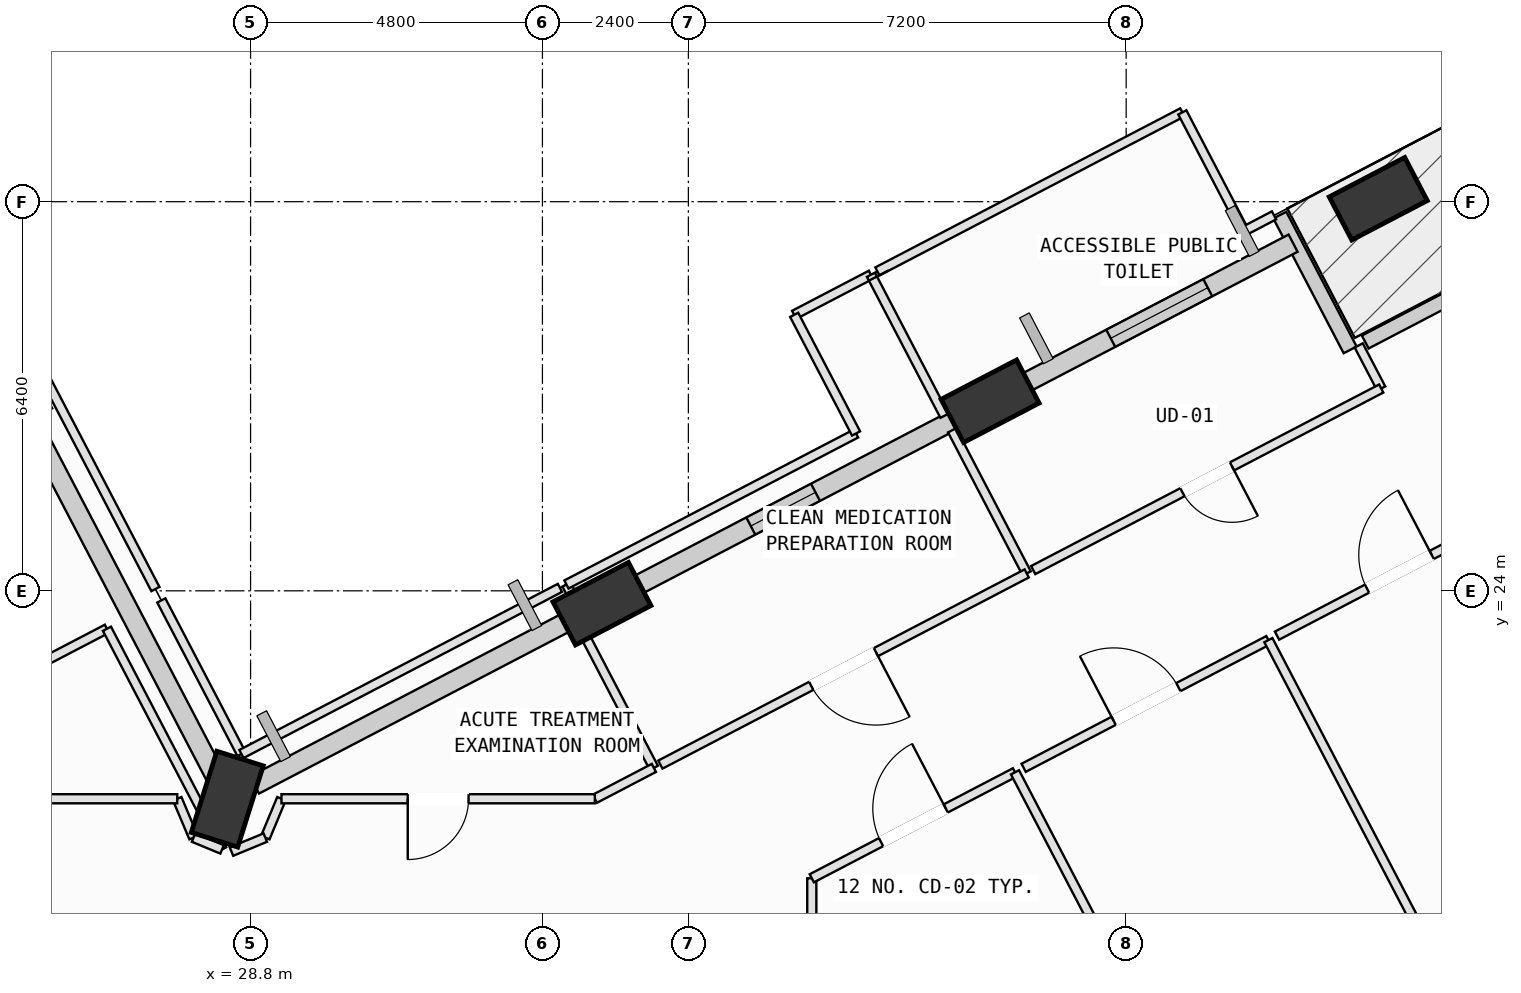
"""IFC4 building model, lengths in metres.
Left out: names, types, materials, properties, quantities, classifications, styles, units other than length and angle.
Written with IfcOpenShell. Run it as: python <this file> out.ifc"""

import sys

from ifc_helpers import new_model, si_unit, direction, frame, frame_2d, origin, origin_2d, place, context, subcontext, project, spatial, rectangle, extrude, element, fill, save


model = new_model("IFC4")
c1 = context("Model", 3, precision=1e-05, world=origin(), true_north=direction((0.0, 1.0)))
c2 = subcontext(c1, "Body", "Model", "MODEL_VIEW")
j1 = project(units=[si_unit("LENGTHUNIT", "METRE"), si_unit("PLANEANGLEUNIT", "RADIAN")], contexts=[c1])
p1 = place(None, origin())
s1 = spatial("IfcSite", under=j1, at=p1, CompositionType="ELEMENT")
p2 = place(p1, origin())
s2 = spatial("IfcBuilding", under=s1, at=p2, CompositionType="ELEMENT")
p3 = place(p2, frame((0.0, 0.0, 140.4)))
s3 = spatial("IfcBuildingStorey", under=s2, at=p3, CompositionType="ELEMENT", Elevation=140.4)
p4 = place(p3, frame((47.346, 30.448, 0.002), z_axis=(-0.023851012449, 0.056700081274, 0.998106321986), x_axis=(-0.638245426133, -0.769307042223, 0.028450848961)))
e1 = element("IfcColumn", 1, at=p4, inside=s3, PredefinedType="COLUMN", context=c2, shape_type="SweptSolid", body=[
    extrude(rectangle(XDim=1.4, YDim=0.8, at=origin_2d()), origin(), (0.0, 0.0, 1.0), 3.961),
])
p5 = place(p3, frame((40.963, 27.118, 0.002), z_axis=(-0.00988620375, 0.030395471157, 0.999489058624), x_axis=(-0.700144747755, -0.713847868711, 0.014783522186)))
e2 = element("IfcColumn", 2, at=p5, inside=s3, PredefinedType="COLUMN", context=c2, shape_type="SweptSolid", body=[
    extrude(rectangle(XDim=1.4, YDim=0.8, at=origin_2d()), origin(), (0.0, 0.0, 1.0), 3.976),
])
p6 = place(p3, frame((34.579, 23.788, 0.002), z_axis=(0.004158950518, 0.004097789481, 0.999982955481), x_axis=(-0.951725992517, 0.306937033708, 0.00270046399)))
e3 = element("IfcColumn", 3, at=p6, inside=s3, PredefinedType="COLUMN", context=c2, shape_type="SweptSolid", body=[
    extrude(rectangle(XDim=1.4, YDim=0.8, at=origin_2d()), origin(), (0.0, 0.0, 1.0), 3.992),
])
p7 = place(p3, frame((28.417, 20.573, 0.002), z_axis=(0.017686891787, -0.02131024809, 0.999616450037), x_axis=(-0.378280780857, 0.925313820027, 0.026419411466)))
e4 = element("IfcColumn", 4, at=p7, inside=s3, PredefinedType="COLUMN", context=c2, shape_type="SweptSolid", body=[
    extrude(rectangle(XDim=1.4, YDim=0.8, at=origin_2d()), origin(), (0.0, 0.0, 1.0), 3.975),
])
p8 = place(p3, frame((47.132, 28.092, 0.0), z_axis=(0.0, 0.0, 1.0), x_axis=(0.886598605973, 0.462539632774, 0.0)))
e5 = element("IfcWall", 5, at=p8, inside=s3, PredefinedType="SOLIDWALL", context=c2, shape_type="SweptSolid", body=[
    extrude(rectangle(XDim=6.96, YDim=0.24, at=frame_2d((3.48, 0.0))), origin(), (0.0, 0.0, 1.0), 2.885),
])
p9 = place(p8, frame((2.93, 0.0, 0.0)))
e6 = element("IfcOpeningElement", 6, at=p9, cuts=e5, PredefinedType="OPENING", context=c2, shape_type="SweptSolid", body=[
    extrude(rectangle(XDim=1.1, YDim=2.15, at=frame_2d((0.55, 1.075))), frame((0.0, 0.13, 0.0), z_axis=(0.0, -1.0, 0.0), x_axis=(1.0, 0.0, 0.0)), (0.0, 0.0, 1.0), 0.26),
])
p10 = place(p3, frame((45.727, 30.179, 0.0), z_axis=(0.0, 0.0, 1.0), x_axis=(0.462499256791, -0.886619669005, 0.0)))
e7 = element("IfcWall", 7, at=p10, inside=s3, PredefinedType="SOLIDWALL", context=c2, shape_type="SweptSolid", body=[
    extrude(rectangle(XDim=2.5, YDim=0.24, at=frame_2d((1.25, 0.0))), origin(), (0.0, 0.0, 1.0), 3.085),
])
p11 = place(p3, frame((41.408, 27.351, 0.0), z_axis=(0.0, 0.0, 1.0), x_axis=(0.886613768791, 0.462510567436, 0.0)))
e8 = element("IfcWall", 8, at=p11, inside=s3, PredefinedType="SOLIDWALL", context=c2, shape_type="SweptSolid", body=[
    extrude(rectangle(XDim=5.117, YDim=0.32, at=frame_2d((2.559, 0.0))), origin(), (0.0, 0.0, 1.0), 3.085),
])
p12 = place(p11, frame((1.735, 0.0, 0.75)))
e9 = element("IfcOpeningElement", 9, at=p12, cuts=e8, PredefinedType="OPENING", context=c2, shape_type="SweptSolid", body=[
    extrude(rectangle(XDim=1.8, YDim=2.05, at=frame_2d((0.9, 1.025))), frame((0.0, 0.17, 0.0), z_axis=(0.0, -1.0, 0.0), x_axis=(1.0, 0.0, 0.0)), (0.0, 0.0, 1.0), 0.34),
])
p13 = place(p3, frame((35.029, 24.023, 0.0), z_axis=(0.0, 0.0, 1.0), x_axis=(0.886606572036, 0.462524363058, 0.0)))
e10 = element("IfcWall", 10, at=p13, inside=s3, PredefinedType="SOLIDWALL", context=c2, shape_type="SweptSolid", body=[
    extrude(rectangle(XDim=6.211, YDim=0.32, at=frame_2d((3.105, 0.0))), origin(), (0.0, 0.0, 1.0), 3.085),
])
p14 = place(p13, frame((2.253, 0.0, 0.75)))
e11 = element("IfcOpeningElement", 11, at=p14, cuts=e10, PredefinedType="OPENING", context=c2, shape_type="SweptSolid", body=[
    extrude(rectangle(XDim=1.2, YDim=1.75, at=frame_2d((0.6, 0.875))), frame((0.0, 0.17, 0.0), z_axis=(0.0, -1.0, 0.0), x_axis=(1.0, 0.0, 0.0)), (0.0, 0.0, 1.0), 0.34),
])
p15 = place(p3, frame((28.865, 20.807, 0.0), z_axis=(0.0, 0.0, 1.0), x_axis=(0.886610408854, 0.462517008241, 0.0)))
e12 = element("IfcWall", 12, at=p15, inside=s3, PredefinedType="SOLIDWALL", context=c2, shape_type="SweptSolid", body=[
    extrude(rectangle(XDim=5.96, YDim=0.32, at=frame_2d((2.98, 0.0))), origin(), (0.0, 0.0, 1.0), 2.885),
])
p16 = place(p3, frame((25.086, 26.959, 0.0), z_axis=(0.0, 0.0, 1.0), x_axis=(0.462504291383, -0.886617042726, 0.0)))
e13 = element("IfcWall", 13, at=p16, inside=s3, PredefinedType="SOLIDWALL", context=c2, shape_type="SweptSolid", body=[
    extrude(rectangle(XDim=6.76, YDim=0.32, at=frame_2d((3.38, 0.0))), origin(), (0.0, 0.0, 1.0), 3.085),
])
p17 = place(p3, frame((38.03, 17.531, 0.0), z_axis=(0.0, 0.0, 1.0), x_axis=(0.0, 1.0, 0.0)))
e14 = element("IfcWall", 14, at=p17, inside=s3, PredefinedType="PARTITIONING", context=c2, shape_type="SweptSolid", body=[
    extrude(rectangle(XDim=1.741, YDim=0.15, at=frame_2d((0.871, 0.0))), origin(), (0.0, 0.0, 1.0), 3.7),
])
p18 = place(p3, frame((38.03, 19.272, 0.0), z_axis=(0.0, 0.0, 1.0), x_axis=(0.886666832125, 0.462408832971, 0.0)))
e15 = element("IfcWall", 15, at=p18, inside=s3, PredefinedType="PARTITIONING", context=c2, shape_type="SweptSolid", body=[
    extrude(rectangle(XDim=3.769, YDim=0.15, at=frame_2d((1.885, 0.0))), origin(), (0.0, 0.0, 1.0), 2.885),
])
p19 = place(p18, frame((1.285, 0.0, 0.0)))
e16 = element("IfcOpeningElement", 16, at=p19, cuts=e15, PredefinedType="OPENING", context=c2, shape_type="SweptSolid", body=[
    extrude(rectangle(XDim=1.2, YDim=2.15, at=frame_2d((0.6, 1.075))), frame((0.0, 0.085, 0.0), z_axis=(0.0, -1.0, 0.0), x_axis=(1.0, 0.0, 0.0)), (0.0, 0.0, 1.0), 0.17),
])
p20 = place(p3, frame((41.372, 21.015, 0.0), z_axis=(0.0, 0.0, 1.0), x_axis=(0.46252584091, -0.88660580107, 0.0)))
e17 = element("IfcWall", 17, at=p20, inside=s3, PredefinedType="PARTITIONING", context=c2, shape_type="SweptSolid", body=[
    extrude(rectangle(XDim=15.164, YDim=0.15, at=frame_2d((7.582, 0.0))), origin(), (0.0, 0.0, 1.0), 3.7),
])
p21 = place(p3, frame((41.514, 21.089, 0.0), z_axis=(0.0, 0.0, 1.0), x_axis=(0.886604981363, 0.462527412185, 0.0)))
e18 = element("IfcWall", 18, at=p21, inside=s3, PredefinedType="PARTITIONING", context=c2, shape_type="SweptSolid", body=[
    extrude(rectangle(XDim=4.54, YDim=0.15, at=frame_2d((2.27, 0.0))), origin(), (0.0, 0.0, 1.0), 3.7),
])
p22 = place(p21, frame((1.67, 0.0, 0.0)))
e19 = element("IfcOpeningElement", 19, at=p22, cuts=e18, PredefinedType="OPENING", context=c2, shape_type="SweptSolid", body=[
    extrude(rectangle(XDim=1.2, YDim=2.15, at=frame_2d((0.6, 1.075))), frame((0.0, 0.085, 0.0), z_axis=(0.0, -1.0, 0.0), x_axis=(1.0, 0.0, 0.0)), (0.0, 0.0, 1.0), 0.17),
])
p23 = place(p3, frame((45.539, 23.189, 0.0), z_axis=(0.0, 0.0, 1.0), x_axis=(0.462519238892, -0.886609245189, 0.0)))
e20 = element("IfcWall", 20, at=p23, inside=s3, PredefinedType="PARTITIONING", context=c2, shape_type="SweptSolid", body=[
    extrude(rectangle(XDim=15.165, YDim=0.15, at=frame_2d((7.582, 0.0))), origin(), (0.0, 0.0, 1.0), 3.285),
])
p24 = place(p3, frame((45.681, 23.263, 0.0), z_axis=(0.0, 0.0, 1.0), x_axis=(0.886582928488, 0.462569682225, 0.0)))
e21 = element("IfcWall", 21, at=p24, inside=s3, PredefinedType="PARTITIONING", context=c2, shape_type="SweptSolid", body=[
    extrude(rectangle(XDim=4.54, YDim=0.15, at=frame_2d((2.27, 0.0))), origin(), (0.0, 0.0, 1.0), 3.7),
])
p25 = place(p24, frame((1.67, 0.0, 0.0)))
e22 = element("IfcOpeningElement", 22, at=p25, cuts=e21, PredefinedType="OPENING", context=c2, shape_type="SweptSolid", body=[
    extrude(rectangle(XDim=1.2, YDim=2.15, at=frame_2d((0.6, 1.075))), frame((0.0, 0.085, 0.0), z_axis=(0.0, -1.0, 0.0), x_axis=(1.0, 0.0, 0.0)), (0.0, 0.0, 1.0), 0.17),
])
p26 = place(p3, frame((27.863, 19.941, 0.0), z_axis=(0.0, 0.0, 1.0), x_axis=(-0.387962564942, 0.921675131596, 0.0)))
e23 = element("IfcWall", 23, at=p26, inside=s3, PredefinedType="PARTITIONING", context=c2, shape_type="SweptSolid", body=[
    extrude(rectangle(XDim=0.693, YDim=0.15, at=frame_2d((0.347, 0.0))), origin(), (0.0, 0.0, 1.0), 3.7),
])
p27 = place(p3, frame((27.594, 20.58, 0.0), z_axis=(0.0, 0.0, 1.0), x_axis=(-1.0, 0.0, 0.0)))
e24 = element("IfcWall", 24, at=p27, inside=s3, PredefinedType="PARTITIONING", context=c2, shape_type="SweptSolid", body=[
    extrude(rectangle(XDim=6.516, YDim=0.15, at=frame_2d((3.258, 0.0))), origin(), (0.0, 0.0, 1.0), 3.7),
])
p28 = place(p27, frame((2.758, 0.0, 0.0)))
e25 = element("IfcOpeningElement", 25, at=p28, cuts=e24, PredefinedType="OPENING", context=c2, shape_type="SweptSolid", body=[
    extrude(rectangle(XDim=1.0, YDim=2.12, at=frame_2d((0.5, 1.06))), frame((0.0, 0.085, 0.0), z_axis=(0.0, -1.0, 0.0), x_axis=(1.0, 0.0, 0.0)), (0.0, 0.0, 1.0), 0.17),
])
p29 = place(p3, frame((21.078, 20.58, 0.0), z_axis=(0.0, 0.0, 1.0), x_axis=(0.886630926341, 0.46247767563, 0.0)))
e26 = element("IfcWall", 26, at=p29, inside=s3, PredefinedType="PARTITIONING", context=c2, shape_type="SweptSolid", body=[
    extrude(rectangle(XDim=6.045, YDim=0.15, at=frame_2d((3.023, 0.0))), origin(), (0.0, 0.0, 1.0), 3.7),
])
p30 = place(p3, frame((26.438, 23.376, 0.0), z_axis=(0.0, 0.0, 1.0), x_axis=(0.462700527586, -0.886514648368, 0.0)))
e27 = element("IfcWall", 27, at=p30, inside=s3, PredefinedType="PARTITIONING", context=c2, shape_type="SweptSolid", body=[
    extrude(rectangle(XDim=4.094, YDim=0.15, at=frame_2d((2.047, 0.0))), origin(), (0.0, 0.0, 1.0), 3.085),
])
p31 = place(p3, frame((28.332, 19.747, 0.0), z_axis=(0.0, 0.0, 1.0), x_axis=(-0.924169144122, 0.381983498403, 0.0)))
e28 = element("IfcWall", 28, at=p31, inside=s3, PredefinedType="PARTITIONING", context=c2, shape_type="SweptSolid", body=[
    extrude(rectangle(XDim=0.508, YDim=0.15, at=frame_2d((0.254, 0.0))), origin(), (0.0, 0.0, 1.0), 3.7),
])
p32 = place(p3, frame((29.308, 20.58, 0.0), z_axis=(0.0, 0.0, 1.0), x_axis=(-0.384364983418, -0.923181217054, 0.0)))
e29 = element("IfcWall", 29, at=p32, inside=s3, PredefinedType="PARTITIONING", context=c2, shape_type="SweptSolid", body=[
    extrude(rectangle(XDim=0.692, YDim=0.15, at=frame_2d((0.346, 0.0))), origin(), (0.0, 0.0, 1.0), 3.7),
])
p33 = place(p3, frame((29.042, 19.941, 0.0), z_axis=(0.0, 0.0, 1.0), x_axis=(-0.92404649346, -0.382280104014, 0.0)))
e30 = element("IfcWall", 30, at=p33, inside=s3, PredefinedType="PARTITIONING", context=c2, shape_type="SweptSolid", body=[
    extrude(rectangle(XDim=0.602, YDim=0.15, at=frame_2d((0.301, 0.0))), origin(), (0.0, 0.0, 1.0), 3.7),
])
p34 = place(p3, frame((27.332, 23.842, 0.0), z_axis=(0.0, 0.0, 1.0), x_axis=(0.462536722732, -0.88660012414, 0.0)))
e31 = element("IfcWall", 31, at=p34, inside=s3, PredefinedType="PARTITIONING", context=c2, shape_type="SweptSolid", body=[
    extrude(rectangle(XDim=2.849, YDim=0.15, at=frame_2d((1.425, 0.0))), origin(), (0.0, 0.0, 1.0), 3.7),
])
p35 = place(p3, frame((28.65, 21.316, 0.0), z_axis=(0.0, 0.0, 1.0), x_axis=(0.886634210414, 0.462471379573, 0.0)))
e32 = element("IfcWall", 32, at=p35, inside=s3, PredefinedType="PARTITIONING", context=c2, shape_type="SweptSolid", body=[
    extrude(rectangle(XDim=5.908, YDim=0.15, at=frame_2d((2.954, 0.0))), origin(), (0.0, 0.0, 1.0), 3.7),
])
p36 = place(p3, frame((34.205, 23.441, 0.0), z_axis=(0.0, 0.0, 1.0), x_axis=(0.462522010932, -0.886607799088, 0.0)))
e33 = element("IfcWall", 33, at=p36, inside=s3, PredefinedType="PARTITIONING", context=c2, shape_type="SweptSolid", body=[
    extrude(rectangle(XDim=2.655, YDim=0.15, at=frame_2d((1.328, 0.0))), origin(), (0.0, 0.0, 1.0), 2.885),
])
p37 = place(p3, frame((35.433, 21.087, 0.0), z_axis=(0.0, 0.0, 1.0), x_axis=(-0.886537156696, -0.462657400025, 0.0)))
e34 = element("IfcWall", 34, at=p37, inside=s3, PredefinedType="PARTITIONING", context=c2, shape_type="SweptSolid", body=[
    extrude(rectangle(XDim=1.095, YDim=0.15, at=frame_2d((0.548, 0.0))), origin(), (0.0, 0.0, 1.0), 3.285),
])
p38 = place(p3, frame((34.462, 20.58, 0.0), z_axis=(0.0, 0.0, 1.0), x_axis=(-1.0, 0.0, 0.0)))
e35 = element("IfcWall", 35, at=p38, inside=s3, PredefinedType="PARTITIONING", context=c2, shape_type="SweptSolid", body=[
    extrude(rectangle(XDim=5.154, YDim=0.15, at=frame_2d((2.577, 0.0))), origin(), (0.0, 0.0, 1.0), 3.285),
])
p39 = place(p38, frame((2.077, 0.0, 0.0)))
e36 = element("IfcOpeningElement", 36, at=p39, cuts=e35, PredefinedType="OPENING", context=c2, shape_type="SweptSolid", body=[
    extrude(rectangle(XDim=1.0, YDim=2.12, at=frame_2d((0.5, 1.06))), frame((0.0, 0.085, 0.0), z_axis=(0.0, -1.0, 0.0), x_axis=(1.0, 0.0, 0.0)), (0.0, 0.0, 1.0), 0.17),
])
p40 = place(p3, frame((37.74, 28.539, 0.0), z_axis=(0.0, 0.0, 1.0), x_axis=(0.886581790222, 0.462571863872, 0.0)))
e37 = element("IfcWall", 37, at=p40, inside=s3, PredefinedType="PARTITIONING", context=c2, shape_type="SweptSolid", body=[
    extrude(rectangle(XDim=1.425, YDim=0.15, at=frame_2d((0.712, 0.0))), origin(), (0.0, 0.0, 1.0), 3.7),
])
p41 = place(p3, frame((39.003, 29.198, 0.0), z_axis=(0.0, 0.0, 1.0), x_axis=(0.462272474662, -0.886737931505, 0.0)))
e38 = element("IfcWall", 38, at=p41, inside=s3, PredefinedType="PARTITIONING", context=c2, shape_type="SweptSolid", body=[
    extrude(rectangle(XDim=2.615, YDim=0.15, at=frame_2d((1.308, 0.0))), origin(), (0.0, 0.0, 1.0), 3.7),
])
p42 = place(p3, frame((40.337, 26.64, 0.0), z_axis=(0.0, 0.0, 1.0), x_axis=(0.462522010932, -0.886607799088, 0.0)))
e39 = element("IfcWall", 39, at=p42, inside=s3, PredefinedType="PARTITIONING", context=c2, shape_type="SweptSolid", body=[
    extrude(rectangle(XDim=2.655, YDim=0.15, at=frame_2d((1.328, 0.0))), origin(), (0.0, 0.0, 1.0), 3.7),
])
p43 = place(p3, frame((41.565, 24.286, 0.0), z_axis=(0.0, 0.0, 1.0), x_axis=(-0.886562425228, -0.462608977618, 0.0)))
e40 = element("IfcWall", 40, at=p43, inside=s3, PredefinedType="PARTITIONING", context=c2, shape_type="SweptSolid", body=[
    extrude(rectangle(XDim=6.796, YDim=0.15, at=frame_2d((3.398, 0.0))), origin(), (0.0, 0.0, 1.0), 3.285),
])
p44 = place(p43, frame((2.798, 0.0, 0.0)))
e41 = element("IfcOpeningElement", 41, at=p44, cuts=e40, PredefinedType="OPENING", context=c2, shape_type="SweptSolid", body=[
    extrude(rectangle(XDim=1.2, YDim=2.15, at=frame_2d((0.6, 1.075))), frame((0.0, 0.085, 0.0), z_axis=(0.0, -1.0, 0.0), x_axis=(1.0, 0.0, 0.0)), (0.0, 0.0, 1.0), 0.17),
])
p45 = place(p3, frame((34.216, 23.681, 0.0), z_axis=(0.0, 0.0, 1.0), x_axis=(-0.46289810048, 0.886411500699, 0.0)))
e42 = element("IfcWall", 42, at=p45, inside=s3, PredefinedType="PARTITIONING", context=c2, shape_type="SweptSolid", body=[
    extrude(rectangle(XDim=0.477, YDim=0.15, at=frame_2d((0.239, 0.0))), origin(), (0.0, 0.0, 1.0), 2.885),
])
p46 = place(p3, frame((33.995, 24.104, 0.0), z_axis=(0.0, 0.0, 1.0), x_axis=(0.886670732114, 0.462401354684, 0.0)))
e43 = element("IfcWall", 43, at=p46, inside=s3, PredefinedType="PARTITIONING", context=c2, shape_type="SweptSolid", body=[
    extrude(rectangle(XDim=5.372, YDim=0.15, at=frame_2d((2.686, 0.0))), origin(), (0.0, 0.0, 1.0), 3.7),
])
p47 = place(p3, frame((38.758, 26.588, 0.0), z_axis=(0.0, 0.0, 1.0), x_axis=(-0.462588753486, 0.886572977903, 0.0)))
e44 = element("IfcWall", 44, at=p47, inside=s3, PredefinedType="PARTITIONING", context=c2, shape_type="SweptSolid", body=[
    extrude(rectangle(XDim=2.201, YDim=0.15, at=frame_2d((1.1, 0.0))), origin(), (0.0, 0.0, 1.0), 3.7),
])
p48 = place(p3, frame((47.025, 28.036, 0.0), z_axis=(0.0, 0.0, 1.0), x_axis=(0.462774641354, -0.886475962065, 0.0)))
e45 = element("IfcWall", 45, at=p48, inside=s3, PredefinedType="PARTITIONING", context=c2, shape_type="SweptSolid", body=[
    extrude(rectangle(XDim=0.8, YDim=0.15, at=frame_2d((0.4, 0.0))), origin(), (0.0, 0.0, 1.0), 3.7),
])
p49 = place(p3, frame((47.395, 27.327, 0.0), z_axis=(0.0, 0.0, 1.0), x_axis=(-0.886626647705, -0.462485878249, 0.0)))
e46 = element("IfcWall", 46, at=p49, inside=s3, PredefinedType="PARTITIONING", context=c2, shape_type="SweptSolid", body=[
    extrude(rectangle(XDim=6.456, YDim=0.15, at=frame_2d((3.228, 0.0))), origin(), (0.0, 0.0, 1.0), 2.885),
])
p50 = place(p49, frame((2.768, 0.0, 0.0)))
e47 = element("IfcOpeningElement", 47, at=p50, cuts=e46, PredefinedType="OPENING", context=c2, shape_type="SweptSolid", body=[
    extrude(rectangle(XDim=0.92, YDim=2.1, at=frame_2d((0.46, 1.05))), frame((0.0, 0.085, 0.0), z_axis=(0.0, -1.0, 0.0), x_axis=(1.0, 0.0, 0.0)), (0.0, 0.0, 1.0), 0.17),
])
p51 = place(p3, frame((39.109, 29.253, 0.0), z_axis=(0.0, 0.0, 1.0), x_axis=(0.886630248392, 0.462478975344, 0.0)))
e48 = element("IfcWall", 48, at=p51, inside=s3, PredefinedType="PARTITIONING", context=c2, shape_type="SweptSolid", body=[
    extrude(rectangle(XDim=5.656, YDim=0.15, at=frame_2d((2.828, 0.0))), origin(), (0.0, 0.0, 1.0), 3.7),
])
p52 = place(p3, frame((44.124, 31.869, 0.0), z_axis=(0.0, 0.0, 1.0), x_axis=(0.462285352706, -0.886731217829, 0.0)))
e49 = element("IfcWall", 49, at=p52, inside=s3, PredefinedType="PARTITIONING", context=c2, shape_type="SweptSolid", body=[
    extrude(rectangle(XDim=2.2, YDim=0.15, at=frame_2d((1.1, 0.0))), origin(), (0.0, 0.0, 1.0), 3.7),
])
p53 = place(p3, frame((45.141, 29.918, 0.0), z_axis=(0.0, 0.0, 1.0), x_axis=(0.885900504864, 0.463875301652, 0.0)))
e50 = element("IfcWall", 50, at=p53, inside=s3, PredefinedType="PARTITIONING", context=c2, shape_type="SweptSolid", body=[
    extrude(rectangle(XDim=0.554, YDim=0.15, at=frame_2d((0.277, 0.0))), origin(), (0.0, 0.0, 1.0), 3.085),
])
p54 = place(p3, frame((24.247, 29.756, 0.0), z_axis=(0.0, 0.0, 1.0), x_axis=(0.462567298335, -0.886584172265, 0.0)))
e51 = element("IfcWall", 51, at=p54, inside=s3, PredefinedType="PARTITIONING", context=c2, shape_type="SweptSolid", body=[
    extrude(rectangle(XDim=6.46, YDim=0.15, at=frame_2d((3.23, 0.0))), origin(), (0.0, 0.0, 1.0), 3.7),
])
p55 = place(p12, origin())
e52 = element("IfcWindow", 52, at=p55, inside=s3, PartitioningType="SINGLE_PANEL", PredefinedType="WINDOW", context=c2, shape_type="SweptSolid", body=[
    extrude(rectangle(XDim=1.8, YDim=2.05, at=frame_2d((0.9, 1.025))), frame((0.0, 0.03, 0.0), z_axis=(0.0, -1.0, 0.0), x_axis=(1.0, 0.0, 0.0)), (0.0, 0.0, 1.0), 0.06),
])
fill(e9, e52)
p56 = place(p14, origin())
e53 = element("IfcWindow", 53, at=p56, inside=s3, PartitioningType="SINGLE_PANEL", PredefinedType="WINDOW", context=c2, shape_type="SweptSolid", body=[
    extrude(rectangle(XDim=1.2, YDim=1.75, at=frame_2d((0.6, 0.875))), frame((0.0, 0.03, 0.0), z_axis=(0.0, -1.0, 0.0), x_axis=(1.0, 0.0, 0.0)), (0.0, 0.0, 1.0), 0.06),
])
fill(e11, e53)
p57 = place(p19, origin())
e54 = element("IfcDoor", 54, at=p57, inside=s3, OperationType="SINGLE_SWING_RIGHT", PredefinedType="DOOR", context=c2, shape_type="SweptSolid", body=[
    extrude(rectangle(XDim=1.2, YDim=2.15, at=frame_2d((0.6, 1.075))), frame((0.0, 0.025, 0.0), z_axis=(0.0, -1.0, 0.0), x_axis=(1.0, 0.0, 0.0)), (0.0, 0.0, 1.0), 0.05),
])
fill(e16, e54)
p58 = place(p22, origin())
e55 = element("IfcDoor", 55, at=p58, inside=s3, OperationType="SINGLE_SWING_LEFT", PredefinedType="DOOR", context=c2, shape_type="SweptSolid", body=[
    extrude(rectangle(XDim=1.2, YDim=2.15, at=frame_2d((0.6, 1.075))), frame((0.0, 0.025, 0.0), z_axis=(0.0, -1.0, 0.0), x_axis=(1.0, 0.0, 0.0)), (0.0, 0.0, 1.0), 0.05),
])
fill(e19, e55)
p59 = place(p25, origin())
e56 = element("IfcDoor", 56, at=p59, inside=s3, OperationType="SINGLE_SWING_RIGHT", PredefinedType="DOOR", context=c2, shape_type="SweptSolid", body=[
    extrude(rectangle(XDim=1.2, YDim=2.15, at=frame_2d((0.6, 1.075))), frame((0.0, 0.025, 0.0), z_axis=(0.0, -1.0, 0.0), x_axis=(1.0, 0.0, 0.0)), (0.0, 0.0, 1.0), 0.05),
])
fill(e22, e56)
p60 = place(p39, origin())
e57 = element("IfcDoor", 57, at=p60, inside=s3, OperationType="SINGLE_SWING_RIGHT", PredefinedType="DOOR", context=c2, shape_type="SweptSolid", body=[
    extrude(rectangle(XDim=1.0, YDim=2.12, at=frame_2d((0.5, 1.06))), frame((0.0, 0.025, 0.0), z_axis=(0.0, -1.0, 0.0), x_axis=(1.0, 0.0, 0.0)), (0.0, 0.0, 1.0), 0.05),
])
fill(e36, e57)
p61 = place(p44, origin())
e58 = element("IfcDoor", 58, at=p61, inside=s3, OperationType="SINGLE_SWING_LEFT", PredefinedType="DOOR", context=c2, shape_type="SweptSolid", body=[
    extrude(rectangle(XDim=1.2, YDim=2.15, at=frame_2d((0.6, 1.075))), frame((0.0, 0.025, 0.0), z_axis=(0.0, -1.0, 0.0), x_axis=(1.0, 0.0, 0.0)), (0.0, 0.0, 1.0), 0.05),
])
fill(e41, e58)
p62 = place(p50, origin())
e59 = element("IfcDoor", 59, at=p62, inside=s3, OperationType="SINGLE_SWING_LEFT", PredefinedType="DOOR", context=c2, shape_type="SweptSolid", body=[
    extrude(rectangle(XDim=0.92, YDim=2.1, at=frame_2d((0.46, 1.05))), frame((0.0, 0.025, 0.0), z_axis=(0.0, -1.0, 0.0), x_axis=(1.0, 0.0, 0.0)), (0.0, 0.0, 1.0), 0.05),
])
fill(e47, e59)
save(model, sys.argv[1])
